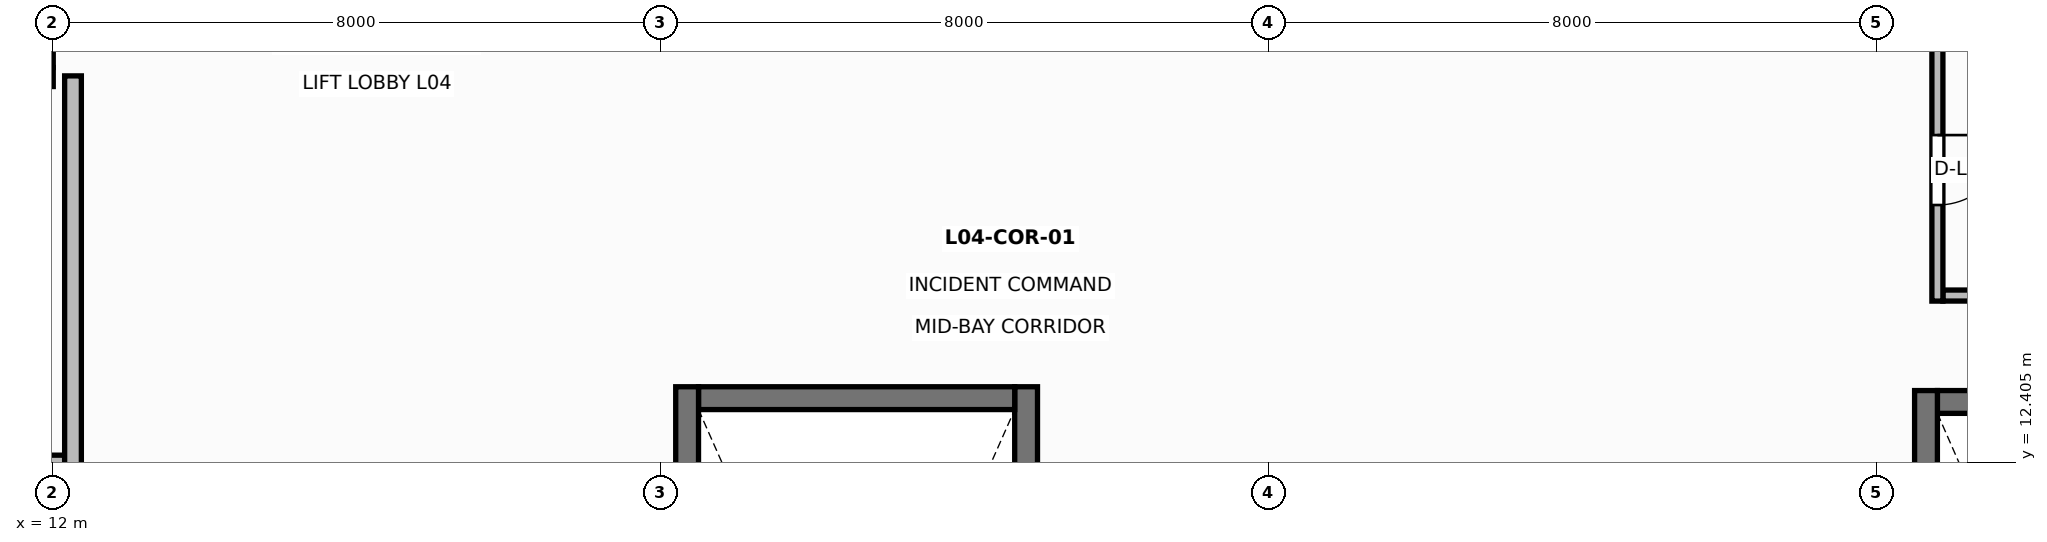
"""IFC4 building model, lengths in metres.
Left out: names, types, materials, properties, quantities, classifications, styles, units other than length and angle.
Written with IfcOpenShell. Run it as: python <this file> out.ifc"""

import sys

from ifc_helpers import new_model, si_unit, direction, frame, frame_2d, origin, place, context, subcontext, project, spatial, rectangle, extrude, element, fill, save


model = new_model("IFC4")
c1 = context("Model", 3, precision=1e-05, world=origin(), true_north=direction((0.0, 1.0)))
c2 = subcontext(c1, "Body", "Model", "MODEL_VIEW")
j1 = project(units=[si_unit("LENGTHUNIT", "METRE"), si_unit("PLANEANGLEUNIT", "RADIAN")], contexts=[c1])
p1 = place(None, origin())
s1 = spatial("IfcSite", under=j1, at=p1, CompositionType="ELEMENT")
p2 = place(p1, origin())
s2 = spatial("IfcBuilding", under=s1, at=p2, CompositionType="ELEMENT")
p3 = place(p2, frame((0.0, 0.0, 19.8)))
s3 = spatial("IfcBuildingStorey", under=s2, at=p3, CompositionType="ELEMENT", Elevation=19.8)
p4 = place(p3, frame((24.81, 3.4, 0.0), z_axis=(0.0, 0.0, 1.0), x_axis=(0.0, 1.0, 0.0)))
e1 = element("IfcWall", 1, at=p4, inside=s3, PredefinedType="SHEAR", context=c2, shape_type="SweptSolid", body=[
    extrude(rectangle(XDim=10.0, YDim=0.3, at=frame_2d((5.0, 0.0))), origin(), (0.0, 0.0, 1.0), 3.98),
])
p5 = place(p4, frame((0.75, 0.0, 0.0)))
e2 = element("IfcOpeningElement", 2, at=p5, cuts=e1, PredefinedType="OPENING", context=c2, shape_type="SweptSolid", body=[
    extrude(rectangle(XDim=1.1, YDim=2.15, at=frame_2d((0.55, 1.075))), frame((0.0, 0.16, 0.0), z_axis=(0.0, -1.0, 0.0), x_axis=(1.0, 0.0, 0.0)), (0.0, 0.0, 1.0), 0.32),
])
p6 = place(p3, frame((24.66, 13.25, 0.0), z_axis=(0.0, 0.0, 1.0), x_axis=(-1.0, 0.0, 0.0)))
e3 = element("IfcWall", 3, at=p6, inside=s3, PredefinedType="SHEAR", context=c2, shape_type="SweptSolid", body=[
    extrude(rectangle(XDim=4.16, YDim=0.3, at=frame_2d((2.08, 0.0))), origin(), (0.0, 0.0, 1.0), 3.98),
])
p7 = place(p3, frame((20.35, 13.4, 0.0), z_axis=(0.0, 0.0, 1.0), x_axis=(0.0, -1.0, 0.0)))
e4 = element("IfcWall", 4, at=p7, inside=s3, PredefinedType="SHEAR", context=c2, shape_type="SweptSolid", body=[
    extrude(rectangle(XDim=10.0, YDim=0.3, at=frame_2d((5.0, 0.0))), origin(), (0.0, 0.0, 1.0), 3.98),
])
p8 = place(p3, frame((40.9, 13.2, 0.0), z_axis=(0.0, 0.0, 1.0), x_axis=(-1.0, 0.0, 0.0)))
e5 = element("IfcWall", 5, at=p8, inside=s3, PredefinedType="SHEAR", context=c2, shape_type="SweptSolid", body=[
    extrude(rectangle(XDim=4.1, YDim=0.3, at=frame_2d((2.05, 0.0))), origin(), (0.0, 0.0, 1.0), 3.98),
])
p9 = place(p3, frame((36.65, 13.35, 0.0), z_axis=(0.0, 0.0, 1.0), x_axis=(0.0, -1.0, 0.0)))
e6 = element("IfcWall", 6, at=p9, inside=s3, PredefinedType="SHEAR", context=c2, shape_type="SweptSolid", body=[
    extrude(rectangle(XDim=9.95, YDim=0.3, at=frame_2d((4.975, 0.0))), origin(), (0.0, 0.0, 1.0), 3.98),
])
p10 = place(p3, frame((9.11, 17.475, 0.0), z_axis=(0.0, 0.0, 1.0), x_axis=(1.0, 0.0, 0.0)))
e7 = element("IfcWall", 7, at=p10, inside=s3, PredefinedType="SOLIDWALL", context=c2, shape_type="SweptSolid", body=[
    extrude(rectangle(XDim=2.9, YDim=0.25, at=frame_2d((1.45, 0.0))), origin(), (0.0, 0.0, 1.0), 3.98),
])
p11 = place(p10, frame((0.75, 0.0, 0.0)))
e8 = element("IfcOpeningElement", 8, at=p11, cuts=e7, PredefinedType="OPENING", context=c2, shape_type="SweptSolid", body=[
    extrude(rectangle(XDim=1.4, YDim=2.25, at=frame_2d((0.7, 1.125))), frame((0.0, 0.135, 0.0), z_axis=(0.0, -1.0, 0.0), x_axis=(1.0, 0.0, 0.0)), (0.0, 0.0, 1.0), 0.27),
])
p12 = place(p3, frame((11.885, 17.6, 0.0), z_axis=(0.0, 0.0, 1.0), x_axis=(0.0, 1.0, 0.0)))
e9 = element("IfcWall", 9, at=p12, inside=s3, PredefinedType="SOLIDWALL", context=c2, shape_type="SweptSolid", body=[
    extrude(rectangle(XDim=2.8, YDim=0.25, at=frame_2d((1.4, 0.0))), origin(), (0.0, 0.0, 1.0), 3.98),
])
p13 = place(p3, frame((9.12, 12.39, 0.0), z_axis=(0.0, 0.0, 1.0), x_axis=(1.0, 0.0, 0.0)))
e10 = element("IfcWall", 10, at=p13, inside=s3, PredefinedType="SOLIDWALL", context=c2, shape_type="SweptSolid", body=[
    extrude(rectangle(XDim=3.04, YDim=0.22, at=frame_2d((1.52, 0.0))), origin(), (0.0, 0.0, 1.0), 3.364),
])
p14 = place(p13, frame((0.805, 0.0, 0.0)))
e11 = element("IfcOpeningElement", 11, at=p14, cuts=e10, PredefinedType="OPENING", context=c2, shape_type="SweptSolid", body=[
    extrude(rectangle(XDim=1.15, YDim=2.15, at=frame_2d((0.575, 1.075))), frame((0.0, 0.12, 0.0), z_axis=(0.0, -1.0, 0.0), x_axis=(1.0, 0.0, 0.0)), (0.0, 0.0, 1.0), 0.24),
])
p15 = place(p3, frame((12.27, 12.28, 0.0), z_axis=(0.0, 0.0, 1.0), x_axis=(0.0, 1.0, 0.0)))
e12 = element("IfcWall", 12, at=p15, inside=s3, PredefinedType="SOLIDWALL", context=c2, shape_type="SweptSolid", body=[
    extrude(rectangle(XDim=5.21, YDim=0.22, at=frame_2d((2.605, 0.0))), origin(), (0.0, 0.0, 1.0), 3.98),
])
p16 = place(p3, frame((36.872, 14.6, 0.0), z_axis=(0.0, 0.0, 1.0), x_axis=(1.0, 0.0, 0.0)))
e13 = element("IfcWall", 13, at=p16, inside=s3, PredefinedType="PARTITIONING", context=c2, shape_type="SweptSolid", body=[
    extrude(rectangle(XDim=5.656, YDim=0.145, at=frame_2d((2.828, 0.0))), origin(), (0.0, 0.0, 1.0), 3.98),
])
p17 = place(p3, frame((36.8, 20.273, 0.0), z_axis=(0.0, 0.0, 1.0), x_axis=(0.0, -1.0, 0.0)))
e14 = element("IfcWall", 14, at=p17, inside=s3, PredefinedType="PARTITIONING", context=c2, shape_type="SweptSolid", body=[
    extrude(rectangle(XDim=5.746, YDim=0.145, at=frame_2d((2.873, 0.0))), origin(), (0.0, 0.0, 1.0), 3.98),
])
p18 = place(p17, frame((3.562, 0.0, 0.0)))
e15 = element("IfcOpeningElement", 15, at=p18, cuts=e14, PredefinedType="OPENING", context=c2, shape_type="SweptSolid", body=[
    extrude(rectangle(XDim=0.92, YDim=2.1, at=frame_2d((0.46, 1.05))), frame((0.0, 0.083, 0.0), z_axis=(0.0, -1.0, 0.0), x_axis=(1.0, 0.0, 0.0)), (0.0, 0.0, 1.0), 0.165),
])
p19 = place(p18, origin())
e16 = element("IfcDoor", 16, at=p19, inside=s3, OperationType="SINGLE_SWING_LEFT", PredefinedType="DOOR", context=c2, shape_type="SweptSolid", body=[
    extrude(rectangle(XDim=0.92, YDim=2.1, at=frame_2d((0.46, 1.05))), frame((0.0, 0.025, 0.0), z_axis=(0.0, -1.0, 0.0), x_axis=(1.0, 0.0, 0.0)), (0.0, 0.0, 1.0), 0.05),
])
fill(e15, e16)
save(model, sys.argv[1])
